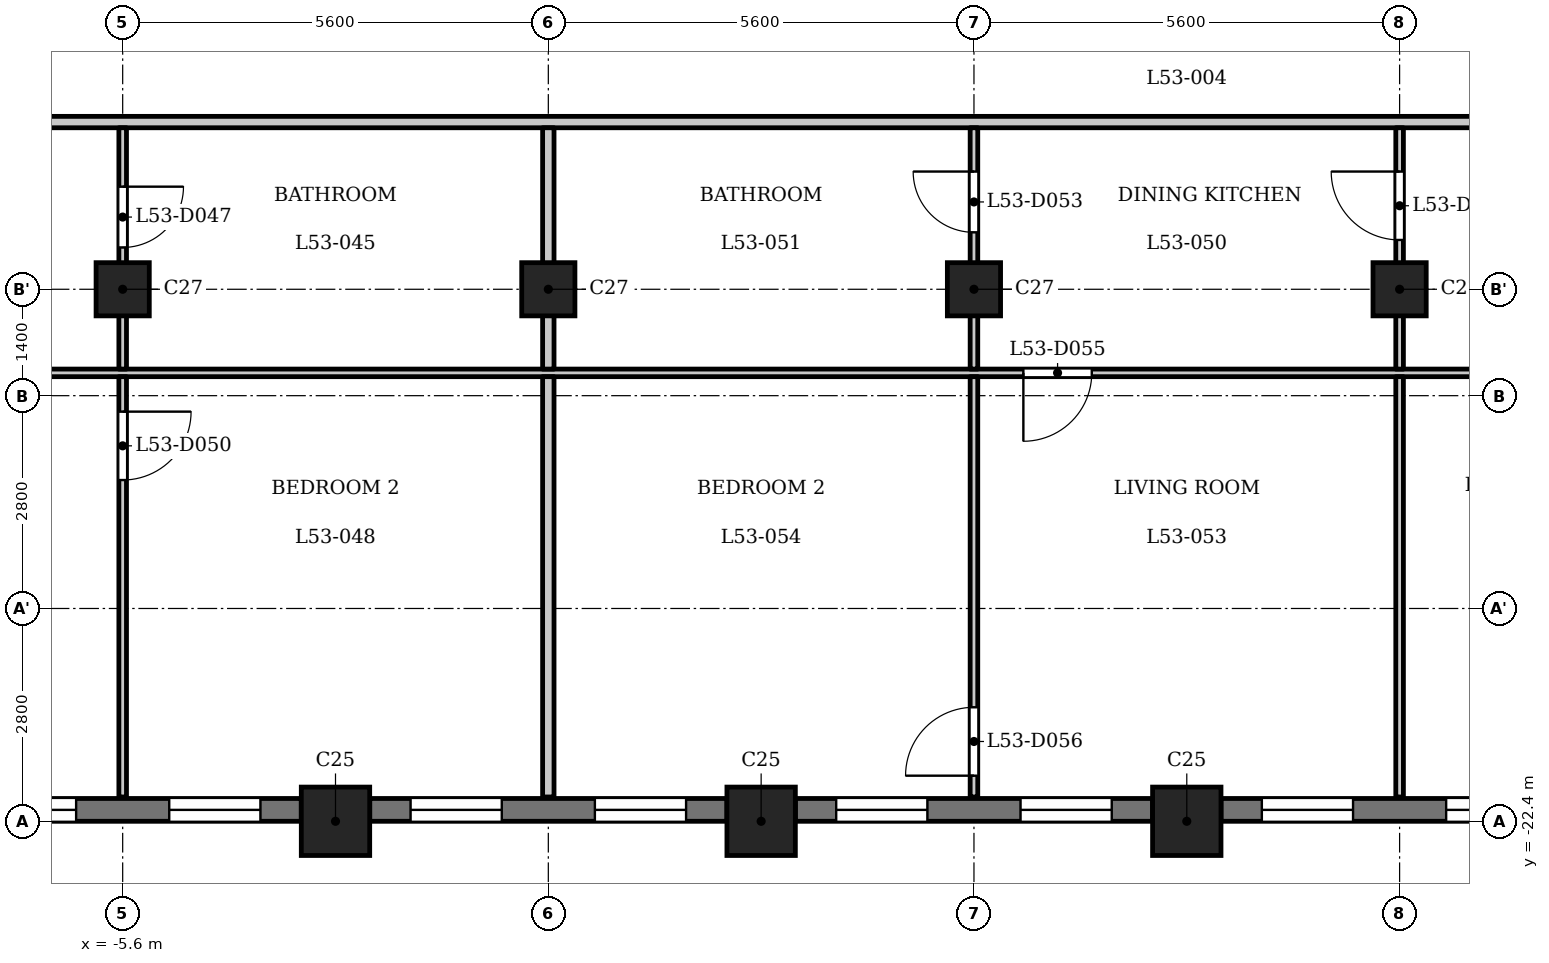
"""IFC4 building model, lengths in metres.
Left out: names, types, materials, properties, quantities, classifications, styles, units other than length and angle.
Written with IfcOpenShell. Run it as: python <this file> out.ifc"""

import sys

from ifc_helpers import new_model, si_unit, direction, frame, frame_2d, origin, origin_2d, place, context, subcontext, project, spatial, rectangle, extrude, element, fill, save


model = new_model("IFC4")
c1 = context("Model", 3, precision=1e-05, world=origin(), true_north=direction((0.0, 1.0)))
c2 = subcontext(c1, "Body", "Model", "MODEL_VIEW")
j1 = project(units=[si_unit("LENGTHUNIT", "METRE"), si_unit("PLANEANGLEUNIT", "RADIAN")], contexts=[c1])
p1 = place(None, origin())
s1 = spatial("IfcSite", under=j1, at=p1, CompositionType="ELEMENT")
p2 = place(p1, origin())
s2 = spatial("IfcBuilding", under=s1, at=p2, CompositionType="ELEMENT")
p3 = place(p2, frame((0.0, 0.0, 206.4)))
s3 = spatial("IfcBuildingStorey", under=s2, at=p3, CompositionType="ELEMENT", Elevation=206.4)
for number, where, z_axis, x_axis in (
    (1, (-2.8, -22.4, 0.0), (0.0, 0.0, 1.0), (1.0, 0.0, 0.0)),
    (2, (2.8, -22.4, 0.0), (0.0, 0.0, 1.0), (1.0, 0.0, 0.0)),
    (3, (8.4, -22.4, 0.0), (0.0, 0.0, 1.0), (1.0, 0.0, 0.0)),
):
    element("IfcColumn", number, at=place(p3, frame(where, z_axis=z_axis, x_axis=x_axis)), inside=s3, PredefinedType="COLUMN", context=c2, shape_type="SweptSolid", body=[
        extrude(rectangle(XDim=0.9, YDim=0.9, at=origin_2d()), origin(), (0.0, 0.0, 1.0), 3.5),
    ])
for number, where, z_axis, x_axis in (
    (4, (-5.6, -15.4, 0.0), (0.0, 0.0, 1.0), (1.0, 0.0, 0.0)),
    (5, (0.0, -15.4, 0.0), (0.0, 0.0, 1.0), (1.0, 0.0, 0.0)),
    (6, (5.6, -15.4, 0.0), (0.0, 0.0, 1.0), (1.0, 0.0, 0.0)),
    (7, (11.2, -15.4, 0.0), (0.0, 0.0, 1.0), (1.0, 0.0, 0.0)),
):
    element("IfcColumn", number, at=place(p3, frame(where, z_axis=z_axis, x_axis=x_axis)), inside=s3, PredefinedType="COLUMN", context=c2, shape_type="SweptSolid", body=[
        extrude(rectangle(XDim=0.7, YDim=0.7, at=origin_2d()), origin(), (0.0, 0.0, 1.0), 3.5),
    ])
p4 = place(p3, frame((-7.95, -22.25, 0.0), z_axis=(0.0, 0.0, 1.0), x_axis=(1.0, 0.0, 0.0)))
e8 = element("IfcWall", 8, at=p4, inside=s3, PredefinedType="SOLIDWALL", context=c2, shape_type="SweptSolid", body=[
    extrude(rectangle(XDim=4.7, YDim=0.3, at=frame_2d((2.35, 0.0))), origin(), (0.0, 0.0, 1.0), 2.5),
])
p5 = place(p4, frame((0.538, 0.0, 0.6)))
e9 = element("IfcOpeningElement", 9, at=p5, cuts=e8, PredefinedType="OPENING", context=c2, shape_type="SweptSolid", body=[
    extrude(rectangle(XDim=1.2, YDim=1.55, at=frame_2d((0.6, 0.775))), frame((0.0, 0.16, 0.0), z_axis=(0.0, -1.0, 0.0), x_axis=(1.0, 0.0, 0.0)), (0.0, 0.0, 1.0), 0.32),
])
p6 = place(p4, frame((2.962, 0.0, 0.6)))
e10 = element("IfcOpeningElement", 10, at=p6, cuts=e8, PredefinedType="OPENING", context=c2, shape_type="SweptSolid", body=[
    extrude(rectangle(XDim=1.2, YDim=1.55, at=frame_2d((0.6, 0.775))), frame((0.0, 0.16, 0.0), z_axis=(0.0, -1.0, 0.0), x_axis=(1.0, 0.0, 0.0)), (0.0, 0.0, 1.0), 0.32),
])
p7 = place(p3, frame((-2.35, -22.25, 0.0), z_axis=(0.0, 0.0, 1.0), x_axis=(1.0, 0.0, 0.0)))
e11 = element("IfcWall", 11, at=p7, inside=s3, PredefinedType="SOLIDWALL", context=c2, shape_type="SweptSolid", body=[
    extrude(rectangle(XDim=4.7, YDim=0.3, at=frame_2d((2.35, 0.0))), origin(), (0.0, 0.0, 1.0), 2.5),
])
p8 = place(p7, frame((0.538, 0.0, 0.6)))
e12 = element("IfcOpeningElement", 12, at=p8, cuts=e11, PredefinedType="OPENING", context=c2, shape_type="SweptSolid", body=[
    extrude(rectangle(XDim=1.2, YDim=1.55, at=frame_2d((0.6, 0.775))), frame((0.0, 0.16, 0.0), z_axis=(0.0, -1.0, 0.0), x_axis=(1.0, 0.0, 0.0)), (0.0, 0.0, 1.0), 0.32),
])
p9 = place(p7, frame((2.962, 0.0, 0.6)))
e13 = element("IfcOpeningElement", 13, at=p9, cuts=e11, PredefinedType="OPENING", context=c2, shape_type="SweptSolid", body=[
    extrude(rectangle(XDim=1.2, YDim=1.55, at=frame_2d((0.6, 0.775))), frame((0.0, 0.16, 0.0), z_axis=(0.0, -1.0, 0.0), x_axis=(1.0, 0.0, 0.0)), (0.0, 0.0, 1.0), 0.32),
])
p10 = place(p3, frame((3.25, -22.25, 0.0), z_axis=(0.0, 0.0, 1.0), x_axis=(1.0, 0.0, 0.0)))
e14 = element("IfcWall", 14, at=p10, inside=s3, PredefinedType="SOLIDWALL", context=c2, shape_type="SweptSolid", body=[
    extrude(rectangle(XDim=4.7, YDim=0.3, at=frame_2d((2.35, 0.0))), origin(), (0.0, 0.0, 1.0), 2.5),
])
p11 = place(p10, frame((0.538, 0.0, 0.6)))
e15 = element("IfcOpeningElement", 15, at=p11, cuts=e14, PredefinedType="OPENING", context=c2, shape_type="SweptSolid", body=[
    extrude(rectangle(XDim=1.2, YDim=1.55, at=frame_2d((0.6, 0.775))), frame((0.0, 0.16, 0.0), z_axis=(0.0, -1.0, 0.0), x_axis=(1.0, 0.0, 0.0)), (0.0, 0.0, 1.0), 0.32),
])
p12 = place(p10, frame((2.962, 0.0, 0.6)))
e16 = element("IfcOpeningElement", 16, at=p12, cuts=e14, PredefinedType="OPENING", context=c2, shape_type="SweptSolid", body=[
    extrude(rectangle(XDim=1.2, YDim=1.55, at=frame_2d((0.6, 0.775))), frame((0.0, 0.16, 0.0), z_axis=(0.0, -1.0, 0.0), x_axis=(1.0, 0.0, 0.0)), (0.0, 0.0, 1.0), 0.32),
])
p13 = place(p3, frame((8.85, -22.25, 0.0), z_axis=(0.0, 0.0, 1.0), x_axis=(1.0, 0.0, 0.0)))
e17 = element("IfcWall", 17, at=p13, inside=s3, PredefinedType="SOLIDWALL", context=c2, shape_type="SweptSolid", body=[
    extrude(rectangle(XDim=4.7, YDim=0.3, at=frame_2d((2.35, 0.0))), origin(), (0.0, 0.0, 1.0), 2.5),
])
p14 = place(p13, frame((0.538, 0.0, 0.6)))
e18 = element("IfcOpeningElement", 18, at=p14, cuts=e17, PredefinedType="OPENING", context=c2, shape_type="SweptSolid", body=[
    extrude(rectangle(XDim=1.2, YDim=1.55, at=frame_2d((0.6, 0.775))), frame((0.0, 0.16, 0.0), z_axis=(0.0, -1.0, 0.0), x_axis=(1.0, 0.0, 0.0)), (0.0, 0.0, 1.0), 0.32),
])
p15 = place(p13, frame((2.962, 0.0, 0.6)))
e19 = element("IfcOpeningElement", 19, at=p15, cuts=e17, PredefinedType="OPENING", context=c2, shape_type="SweptSolid", body=[
    extrude(rectangle(XDim=1.2, YDim=1.55, at=frame_2d((0.6, 0.775))), frame((0.0, 0.16, 0.0), z_axis=(0.0, -1.0, 0.0), x_axis=(1.0, 0.0, 0.0)), (0.0, 0.0, 1.0), 0.32),
])
p16 = place(p3, frame((-16.725, -16.5, 0.0), z_axis=(0.0, 0.0, 1.0), x_axis=(1.0, 0.0, 0.0)))
e20 = element("IfcWall", 20, at=p16, inside=s3, PredefinedType="PARTITIONING", context=c2, shape_type="SweptSolid", body=[
    extrude(rectangle(XDim=33.45, YDim=0.1, at=frame_2d((16.725, 0.0))), origin(), (0.0, 0.0, 1.0), 3.2),
])
p17 = place(p16, frame((4.075, 0.0, 0.0)))
e21 = element("IfcOpeningElement", 21, at=p17, cuts=e20, PredefinedType="OPENING", context=c2, shape_type="SweptSolid", body=[
    extrude(rectangle(XDim=0.9, YDim=2.1, at=frame_2d((0.45, 1.05))), frame((0.0, 0.06, 0.0), z_axis=(0.0, -1.0, 0.0), x_axis=(1.0, 0.0, 0.0)), (0.0, 0.0, 1.0), 0.12),
])
p18 = place(p16, frame((6.175, 0.0, 0.0)))
e22 = element("IfcOpeningElement", 22, at=p18, cuts=e20, PredefinedType="OPENING", context=c2, shape_type="SweptSolid", body=[
    extrude(rectangle(XDim=0.9, YDim=2.1, at=frame_2d((0.45, 1.05))), frame((0.0, 0.06, 0.0), z_axis=(0.0, -1.0, 0.0), x_axis=(1.0, 0.0, 0.0)), (0.0, 0.0, 1.0), 0.12),
])
p19 = place(p16, frame((30.575, 0.0, 0.0)))
e23 = element("IfcOpeningElement", 23, at=p19, cuts=e20, PredefinedType="OPENING", context=c2, shape_type="SweptSolid", body=[
    extrude(rectangle(XDim=0.9, YDim=2.1, at=frame_2d((0.45, 1.05))), frame((0.0, 0.06, 0.0), z_axis=(0.0, -1.0, 0.0), x_axis=(1.0, 0.0, 0.0)), (0.0, 0.0, 1.0), 0.12),
])
p20 = place(p16, frame((22.975, 0.0, 0.0)))
e24 = element("IfcOpeningElement", 24, at=p20, cuts=e20, PredefinedType="OPENING", context=c2, shape_type="SweptSolid", body=[
    extrude(rectangle(XDim=0.9, YDim=2.1, at=frame_2d((0.45, 1.05))), frame((0.0, 0.06, 0.0), z_axis=(0.0, -1.0, 0.0), x_axis=(1.0, 0.0, 0.0)), (0.0, 0.0, 1.0), 0.12),
])
p21 = place(p3, frame((-17.4, -13.2, 0.0), z_axis=(0.0, 0.0, 1.0), x_axis=(1.0, 0.0, 0.0)))
e25 = element("IfcWall", 25, at=p21, inside=s3, PredefinedType="PARTITIONING", context=c2, shape_type="SweptSolid", body=[
    extrude(rectangle(XDim=34.8, YDim=0.15, at=frame_2d((17.4, 0.0))), origin(), (0.0, 0.0, 1.0), 3.2),
])
p22 = place(p21, frame((0.15, 0.0, 0.0)))
e26 = element("IfcOpeningElement", 26, at=p22, cuts=e25, PredefinedType="OPENING", context=c2, shape_type="SweptSolid", body=[
    extrude(rectangle(XDim=1.0, YDim=2.1, at=frame_2d((0.5, 1.05))), frame((0.0, 0.085, 0.0), z_axis=(0.0, -1.0, 0.0), x_axis=(1.0, 0.0, 0.0)), (0.0, 0.0, 1.0), 0.17),
])
p23 = place(p21, frame((33.55, 0.0, 0.0)))
e27 = element("IfcOpeningElement", 27, at=p23, cuts=e25, PredefinedType="OPENING", context=c2, shape_type="SweptSolid", body=[
    extrude(rectangle(XDim=1.0, YDim=2.1, at=frame_2d((0.5, 1.05))), frame((0.0, 0.085, 0.0), z_axis=(0.0, -1.0, 0.0), x_axis=(1.0, 0.0, 0.0)), (0.0, 0.0, 1.0), 0.17),
])
p24 = place(p3, frame((-5.6, -22.08, 0.0), z_axis=(0.0, 0.0, 1.0), x_axis=(0.0, 1.0, 0.0)))
e28 = element("IfcWall", 28, at=p24, inside=s3, PredefinedType="PARTITIONING", context=c2, shape_type="SweptSolid", body=[
    extrude(rectangle(XDim=5.53, YDim=0.1, at=frame_2d((2.765, 0.0))), origin(), (0.0, 0.0, 1.0), 3.2),
])
p25 = place(p24, frame((4.17, 0.0, 0.0)))
e29 = element("IfcOpeningElement", 29, at=p25, cuts=e28, PredefinedType="OPENING", context=c2, shape_type="SweptSolid", body=[
    extrude(rectangle(XDim=0.9, YDim=2.1, at=frame_2d((0.45, 1.05))), frame((0.0, 0.06, 0.0), z_axis=(0.0, -1.0, 0.0), x_axis=(1.0, 0.0, 0.0)), (0.0, 0.0, 1.0), 0.12),
])
p26 = place(p3, frame((-5.6, -16.45, 0.0), z_axis=(0.0, 0.0, 1.0), x_axis=(0.0, 1.0, 0.0)))
e30 = element("IfcWall", 30, at=p26, inside=s3, PredefinedType="PARTITIONING", context=c2, shape_type="SweptSolid", body=[
    extrude(rectangle(XDim=3.175, YDim=0.1, at=frame_2d((1.587, 0.0))), origin(), (0.0, 0.0, 1.0), 3.2),
])
p27 = place(p26, frame((1.6, 0.0, 0.0)))
e31 = element("IfcOpeningElement", 31, at=p27, cuts=e30, PredefinedType="OPENING", context=c2, shape_type="SweptSolid", body=[
    extrude(rectangle(XDim=0.8, YDim=2.1, at=frame_2d((0.4, 1.05))), frame((0.0, 0.06, 0.0), z_axis=(0.0, -1.0, 0.0), x_axis=(1.0, 0.0, 0.0)), (0.0, 0.0, 1.0), 0.12),
])
p28 = place(p3, frame((0.0, -22.08, 0.0), z_axis=(0.0, 0.0, 1.0), x_axis=(0.0, 1.0, 0.0)))
e32 = element("IfcWall", 32, at=p28, inside=s3, PredefinedType="PARTITIONING", context=c2, shape_type="SweptSolid", body=[
    extrude(rectangle(XDim=5.53, YDim=0.15, at=frame_2d((2.765, 0.0))), origin(), (0.0, 0.0, 1.0), 3.2),
])
p29 = place(p3, frame((0.0, -16.45, 0.0), z_axis=(0.0, 0.0, 1.0), x_axis=(0.0, 1.0, 0.0)))
e33 = element("IfcWall", 33, at=p29, inside=s3, PredefinedType="PARTITIONING", context=c2, shape_type="SweptSolid", body=[
    extrude(rectangle(XDim=3.175, YDim=0.15, at=frame_2d((1.587, 0.0))), origin(), (0.0, 0.0, 1.0), 3.2),
])
p30 = place(p3, frame((5.6, -22.08, 0.0), z_axis=(0.0, 0.0, 1.0), x_axis=(0.0, 1.0, 0.0)))
e34 = element("IfcWall", 34, at=p30, inside=s3, PredefinedType="PARTITIONING", context=c2, shape_type="SweptSolid", body=[
    extrude(rectangle(XDim=5.53, YDim=0.1, at=frame_2d((2.765, 0.0))), origin(), (0.0, 0.0, 1.0), 3.2),
])
p31 = place(p30, frame((0.28, 0.0, 0.0)))
e35 = element("IfcOpeningElement", 35, at=p31, cuts=e34, PredefinedType="OPENING", context=c2, shape_type="SweptSolid", body=[
    extrude(rectangle(XDim=0.9, YDim=2.1, at=frame_2d((0.45, 1.05))), frame((0.0, 0.06, 0.0), z_axis=(0.0, -1.0, 0.0), x_axis=(1.0, 0.0, 0.0)), (0.0, 0.0, 1.0), 0.12),
])
p32 = place(p3, frame((5.6, -16.45, 0.0), z_axis=(0.0, 0.0, 1.0), x_axis=(0.0, 1.0, 0.0)))
e36 = element("IfcWall", 36, at=p32, inside=s3, PredefinedType="PARTITIONING", context=c2, shape_type="SweptSolid", body=[
    extrude(rectangle(XDim=3.175, YDim=0.1, at=frame_2d((1.587, 0.0))), origin(), (0.0, 0.0, 1.0), 3.2),
])
p33 = place(p32, frame((1.799, 0.0, 0.0)))
e37 = element("IfcOpeningElement", 37, at=p33, cuts=e36, PredefinedType="OPENING", context=c2, shape_type="SweptSolid", body=[
    extrude(rectangle(XDim=0.8, YDim=2.1, at=frame_2d((0.4, 1.05))), frame((0.0, 0.06, 0.0), z_axis=(0.0, -1.0, 0.0), x_axis=(1.0, 0.0, 0.0)), (0.0, 0.0, 1.0), 0.12),
])
p34 = place(p3, frame((11.2, -22.08, 0.0), z_axis=(0.0, 0.0, 1.0), x_axis=(0.0, 1.0, 0.0)))
e38 = element("IfcWall", 38, at=p34, inside=s3, PredefinedType="PARTITIONING", context=c2, shape_type="SweptSolid", body=[
    extrude(rectangle(XDim=5.53, YDim=0.1, at=frame_2d((2.765, 0.0))), origin(), (0.0, 0.0, 1.0), 3.2),
])
p35 = place(p3, frame((11.2, -16.45, 0.0), z_axis=(0.0, 0.0, 1.0), x_axis=(0.0, 1.0, 0.0)))
e39 = element("IfcWall", 39, at=p35, inside=s3, PredefinedType="PARTITIONING", context=c2, shape_type="SweptSolid", body=[
    extrude(rectangle(XDim=3.175, YDim=0.1, at=frame_2d((1.587, 0.0))), origin(), (0.0, 0.0, 1.0), 3.2),
])
p36 = place(p35, frame((1.699, 0.0, 0.0)))
e40 = element("IfcOpeningElement", 40, at=p36, cuts=e39, PredefinedType="OPENING", context=c2, shape_type="SweptSolid", body=[
    extrude(rectangle(XDim=0.9, YDim=2.1, at=frame_2d((0.45, 1.05))), frame((0.0, 0.06, 0.0), z_axis=(0.0, -1.0, 0.0), x_axis=(1.0, 0.0, 0.0)), (0.0, 0.0, 1.0), 0.12),
])
p37 = place(p27, origin())
e41 = element("IfcDoor", 41, at=p37, inside=s3, OperationType="SINGLE_SWING_RIGHT", PredefinedType="DOOR", context=c2, shape_type="SweptSolid", body=[
    extrude(rectangle(XDim=0.8, YDim=2.1, at=frame_2d((0.4, 1.05))), frame((0.0, 0.025, 0.0), z_axis=(0.0, -1.0, 0.0), x_axis=(1.0, 0.0, 0.0)), (0.0, 0.0, 1.0), 0.05),
])
fill(e31, e41)
p38 = place(p25, origin())
e42 = element("IfcDoor", 42, at=p38, inside=s3, OperationType="SINGLE_SWING_RIGHT", PredefinedType="DOOR", context=c2, shape_type="SweptSolid", body=[
    extrude(rectangle(XDim=0.9, YDim=2.1, at=frame_2d((0.45, 1.05))), frame((0.0, 0.025, 0.0), z_axis=(0.0, -1.0, 0.0), x_axis=(1.0, 0.0, 0.0)), (0.0, 0.0, 1.0), 0.05),
])
fill(e29, e42)
p39 = place(p36, origin())
e43 = element("IfcDoor", 43, at=p39, inside=s3, OperationType="SINGLE_SWING_LEFT", PredefinedType="DOOR", context=c2, shape_type="SweptSolid", body=[
    extrude(rectangle(XDim=0.9, YDim=2.1, at=frame_2d((0.45, 1.05))), frame((0.0, 0.025, 0.0), z_axis=(0.0, -1.0, 0.0), x_axis=(1.0, 0.0, 0.0)), (0.0, 0.0, 1.0), 0.05),
])
fill(e40, e43)
p40 = place(p33, origin())
e44 = element("IfcDoor", 44, at=p40, inside=s3, OperationType="SINGLE_SWING_LEFT", PredefinedType="DOOR", context=c2, shape_type="SweptSolid", body=[
    extrude(rectangle(XDim=0.8, YDim=2.1, at=frame_2d((0.4, 1.05))), frame((0.0, 0.025, 0.0), z_axis=(0.0, -1.0, 0.0), x_axis=(1.0, 0.0, 0.0)), (0.0, 0.0, 1.0), 0.05),
])
fill(e37, e44)
p41 = place(p20, origin())
e45 = element("IfcDoor", 45, at=p41, inside=s3, OperationType="SINGLE_SWING_LEFT", PredefinedType="DOOR", context=c2, shape_type="SweptSolid", body=[
    extrude(rectangle(XDim=0.9, YDim=2.1, at=frame_2d((0.45, 1.05))), frame((0.0, 0.025, 0.0), z_axis=(0.0, -1.0, 0.0), x_axis=(1.0, 0.0, 0.0)), (0.0, 0.0, 1.0), 0.05),
])
fill(e24, e45)
p42 = place(p31, origin())
e46 = element("IfcDoor", 46, at=p42, inside=s3, OperationType="SINGLE_SWING_RIGHT", PredefinedType="DOOR", context=c2, shape_type="SweptSolid", body=[
    extrude(rectangle(XDim=0.9, YDim=2.1, at=frame_2d((0.45, 1.05))), frame((0.0, 0.025, 0.0), z_axis=(0.0, -1.0, 0.0), x_axis=(1.0, 0.0, 0.0)), (0.0, 0.0, 1.0), 0.05),
])
fill(e35, e46)
p43 = place(p5, origin())
e47 = element("IfcWindow", 47, at=p43, inside=s3, PartitioningType="SINGLE_PANEL", PredefinedType="WINDOW", context=c2, shape_type="SweptSolid", body=[
    extrude(rectangle(XDim=1.2, YDim=1.55, at=frame_2d((0.6, 0.775))), frame((0.0, 0.03, 0.0), z_axis=(0.0, -1.0, 0.0), x_axis=(1.0, 0.0, 0.0)), (0.0, 0.0, 1.0), 0.06),
])
fill(e9, e47)
p44 = place(p6, origin())
e48 = element("IfcWindow", 48, at=p44, inside=s3, PartitioningType="SINGLE_PANEL", PredefinedType="WINDOW", context=c2, shape_type="SweptSolid", body=[
    extrude(rectangle(XDim=1.2, YDim=1.55, at=frame_2d((0.6, 0.775))), frame((0.0, 0.03, 0.0), z_axis=(0.0, -1.0, 0.0), x_axis=(1.0, 0.0, 0.0)), (0.0, 0.0, 1.0), 0.06),
])
fill(e10, e48)
p45 = place(p8, origin())
e49 = element("IfcWindow", 49, at=p45, inside=s3, PartitioningType="SINGLE_PANEL", PredefinedType="WINDOW", context=c2, shape_type="SweptSolid", body=[
    extrude(rectangle(XDim=1.2, YDim=1.55, at=frame_2d((0.6, 0.775))), frame((0.0, 0.03, 0.0), z_axis=(0.0, -1.0, 0.0), x_axis=(1.0, 0.0, 0.0)), (0.0, 0.0, 1.0), 0.06),
])
fill(e12, e49)
p46 = place(p9, origin())
e50 = element("IfcWindow", 50, at=p46, inside=s3, PartitioningType="SINGLE_PANEL", PredefinedType="WINDOW", context=c2, shape_type="SweptSolid", body=[
    extrude(rectangle(XDim=1.2, YDim=1.55, at=frame_2d((0.6, 0.775))), frame((0.0, 0.03, 0.0), z_axis=(0.0, -1.0, 0.0), x_axis=(1.0, 0.0, 0.0)), (0.0, 0.0, 1.0), 0.06),
])
fill(e13, e50)
p47 = place(p11, origin())
e51 = element("IfcWindow", 51, at=p47, inside=s3, PartitioningType="SINGLE_PANEL", PredefinedType="WINDOW", context=c2, shape_type="SweptSolid", body=[
    extrude(rectangle(XDim=1.2, YDim=1.55, at=frame_2d((0.6, 0.775))), frame((0.0, 0.03, 0.0), z_axis=(0.0, -1.0, 0.0), x_axis=(1.0, 0.0, 0.0)), (0.0, 0.0, 1.0), 0.06),
])
fill(e15, e51)
p48 = place(p12, origin())
e52 = element("IfcWindow", 52, at=p48, inside=s3, PartitioningType="SINGLE_PANEL", PredefinedType="WINDOW", context=c2, shape_type="SweptSolid", body=[
    extrude(rectangle(XDim=1.2, YDim=1.55, at=frame_2d((0.6, 0.775))), frame((0.0, 0.03, 0.0), z_axis=(0.0, -1.0, 0.0), x_axis=(1.0, 0.0, 0.0)), (0.0, 0.0, 1.0), 0.06),
])
fill(e16, e52)
p49 = place(p14, origin())
e53 = element("IfcWindow", 53, at=p49, inside=s3, PartitioningType="SINGLE_PANEL", PredefinedType="WINDOW", context=c2, shape_type="SweptSolid", body=[
    extrude(rectangle(XDim=1.2, YDim=1.55, at=frame_2d((0.6, 0.775))), frame((0.0, 0.03, 0.0), z_axis=(0.0, -1.0, 0.0), x_axis=(1.0, 0.0, 0.0)), (0.0, 0.0, 1.0), 0.06),
])
fill(e18, e53)
p50 = place(p15, origin())
e54 = element("IfcWindow", 54, at=p50, inside=s3, PartitioningType="SINGLE_PANEL", PredefinedType="WINDOW", context=c2, shape_type="SweptSolid", body=[
    extrude(rectangle(XDim=1.2, YDim=1.55, at=frame_2d((0.6, 0.775))), frame((0.0, 0.03, 0.0), z_axis=(0.0, -1.0, 0.0), x_axis=(1.0, 0.0, 0.0)), (0.0, 0.0, 1.0), 0.06),
])
fill(e19, e54)
save(model, sys.argv[1])
